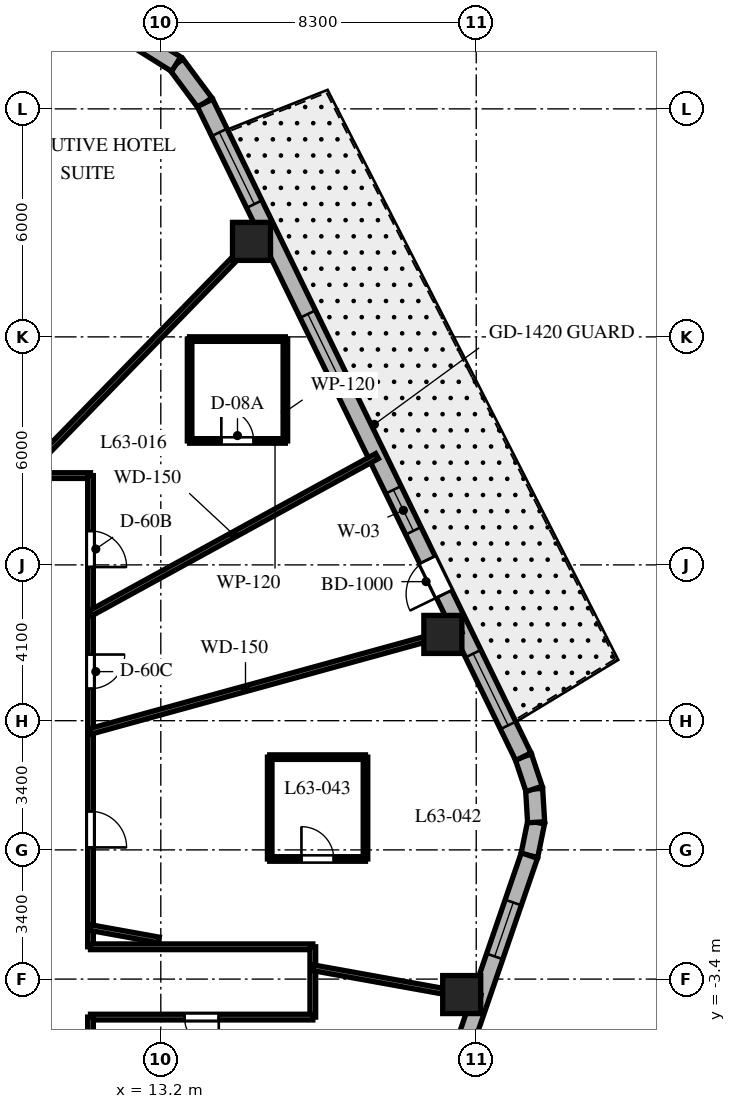
"""IFC4 building model, lengths in metres.
Left out: names, types, materials, properties, quantities, classifications, styles, units other than length and angle.
Written with IfcOpenShell. Run it as: python <this file> out.ifc"""

import sys

from ifc_helpers import new_model, si_unit, direction, frame, frame_2d, origin, origin_2d, place, context, subcontext, project, spatial, rectangle, extrude, element, fill, save


model = new_model("IFC4")
c1 = context("Model", 3, precision=1e-05, world=origin(), true_north=direction((0.0, 1.0)))
c2 = subcontext(c1, "Body", "Model", "MODEL_VIEW")
j1 = project(units=[si_unit("LENGTHUNIT", "METRE"), si_unit("PLANEANGLEUNIT", "RADIAN")], contexts=[c1])
p1 = place(None, origin())
s1 = spatial("IfcSite", under=j1, at=p1, CompositionType="ELEMENT")
p2 = place(p1, origin())
s2 = spatial("IfcBuilding", under=s1, at=p2, CompositionType="ELEMENT")
p3 = place(p2, frame((0.0, 0.0, 252.1)))
s3 = spatial("IfcBuildingStorey", under=s2, at=p3, CompositionType="ELEMENT", Elevation=252.1)
for number, where, z_axis, x_axis in (
    (1, (21.118, -3.807, 0.0), (0.0, 0.0, 1.0), (1.0, 0.0, 0.0)),
    (2, (20.622, 5.67, 0.0), (0.0, 0.0, 1.0), (1.0, 0.0, 0.0)),
    (3, (15.587, 16.013, 0.0), (0.0, 0.0, 1.0), (1.0, 0.0, 0.0)),
):
    element("IfcColumn", number, at=place(p3, frame(where, z_axis=z_axis, x_axis=x_axis)), inside=s3, PredefinedType="COLUMN", context=c2, shape_type="SweptSolid", body=[
        extrude(rectangle(XDim=1.0, YDim=1.0, at=origin_2d()), origin(), (0.0, 0.0, 1.0), 3.8),
    ])
p4 = place(p3, frame((22.898, -0.15, 0.0), z_axis=(0.0, 0.0, 1.0), x_axis=(0.199055826889, 0.979988151858, 0.0)))
e4 = element("IfcWall", 4, at=p4, inside=s3, PredefinedType="SOLIDWALL", context=c2, shape_type="SweptSolid", body=[
    extrude(rectangle(XDim=0.894, YDim=0.45, at=frame_2d((0.447, 0.0))), origin(), (0.0, 0.0, 1.0), 3.48),
])
p5 = place(p3, frame((23.076, 0.727, 0.0), z_axis=(0.0, 0.0, 1.0), x_axis=(-0.060805222108, 0.998149650586, 0.0)))
e5 = element("IfcWall", 5, at=p5, inside=s3, PredefinedType="SOLIDWALL", context=c2, shape_type="SweptSolid", body=[
    extrude(rectangle(XDim=0.879, YDim=0.45, at=frame_2d((0.44, 0.0))), origin(), (0.0, 0.0, 1.0), 3.48),
])
p6 = place(p3, frame((23.023, 1.604, 0.0), z_axis=(0.0, 0.0, 1.0), x_axis=(-0.316801227695, 0.948491951537, 0.0)))
e6 = element("IfcWall", 6, at=p6, inside=s3, PredefinedType="SOLIDWALL", context=c2, shape_type="SweptSolid", body=[
    extrude(rectangle(XDim=0.894, YDim=0.45, at=frame_2d((0.447, 0.0))), origin(), (0.0, 0.0, 1.0), 3.48),
])
p7 = place(p3, frame((14.362, 19.658, 0.0), z_axis=(0.0, 0.0, 1.0), x_axis=(-0.596642462792, 0.80250717853, 0.0)))
e7 = element("IfcWall", 7, at=p7, inside=s3, PredefinedType="SOLIDWALL", context=c2, shape_type="SweptSolid", body=[
    extrude(rectangle(XDim=1.27, YDim=0.45, at=frame_2d((0.635, 0.0))), origin(), (0.0, 0.0, 1.0), 3.48),
])
p8 = place(p3, frame((13.604, 20.678, 0.0), z_axis=(0.0, 0.0, 1.0), x_axis=(-0.847910404124, 0.53013955387, 0.0)))
e8 = element("IfcWall", 8, at=p8, inside=s3, PredefinedType="SOLIDWALL", context=c2, shape_type="SweptSolid", body=[
    extrude(rectangle(XDim=1.249, YDim=0.45, at=frame_2d((0.624, 0.0))), origin(), (0.0, 0.0, 1.0), 3.48),
])
p9 = place(p3, frame((16.324, -19.275, 0.0), z_axis=(0.0, 0.0, 1.0), x_axis=(0.325083142304, 0.945685439557, 0.0)))
e9 = element("IfcWall", 9, at=p9, inside=s3, PredefinedType="SOLIDWALL", context=c2, shape_type="SweptSolid", body=[
    extrude(rectangle(XDim=20.224, YDim=0.45, at=frame_2d((10.112, 0.0))), origin(), (0.0, 0.0, 1.0), 3.48),
])
p10 = place(p9, frame((1.253, 0.0, 0.8)))
e10 = element("IfcOpeningElement", 10, at=p10, cuts=e9, PredefinedType="OPENING", context=c2, shape_type="SweptSolid", body=[
    extrude(rectangle(XDim=1.5, YDim=1.8, at=frame_2d((0.75, 0.9))), frame((0.0, 0.235, 0.0), z_axis=(0.0, -1.0, 0.0), x_axis=(1.0, 0.0, 0.0)), (0.0, 0.0, 1.0), 0.47),
])
p11 = place(p9, frame((6.568, 0.0, 0.8)))
e11 = element("IfcOpeningElement", 11, at=p11, cuts=e9, PredefinedType="OPENING", context=c2, shape_type="SweptSolid", body=[
    extrude(rectangle(XDim=1.5, YDim=1.8, at=frame_2d((0.75, 0.9))), frame((0.0, 0.235, 0.0), z_axis=(0.0, -1.0, 0.0), x_axis=(1.0, 0.0, 0.0)), (0.0, 0.0, 1.0), 0.47),
])
p12 = place(p9, frame((12.25, 0.0, 0.8)))
e12 = element("IfcOpeningElement", 12, at=p12, cuts=e9, PredefinedType="OPENING", context=c2, shape_type="SweptSolid", body=[
    extrude(rectangle(XDim=1.5, YDim=1.8, at=frame_2d((0.75, 0.9))), frame((0.0, 0.235, 0.0), z_axis=(0.0, -1.0, 0.0), x_axis=(1.0, 0.0, 0.0)), (0.0, 0.0, 1.0), 0.47),
])
p13 = place(p9, frame((17.418, 0.0, 0.8)))
e13 = element("IfcOpeningElement", 13, at=p13, cuts=e9, PredefinedType="OPENING", context=c2, shape_type="SweptSolid", body=[
    extrude(rectangle(XDim=1.5, YDim=1.8, at=frame_2d((0.75, 0.9))), frame((0.0, 0.235, 0.0), z_axis=(0.0, -1.0, 0.0), x_axis=(1.0, 0.0, 0.0)), (0.0, 0.0, 1.0), 0.47),
])
p14 = place(p3, frame((22.74, 2.452, 0.0), z_axis=(0.0, 0.0, 1.0), x_axis=(-0.437753424814, 0.899095066755, 0.0)))
e14 = element("IfcWall", 14, at=p14, inside=s3, PredefinedType="SOLIDWALL", context=c2, shape_type="SweptSolid", body=[
    extrude(rectangle(XDim=19.137, YDim=0.45, at=frame_2d((9.569, 0.0))), origin(), (0.0, 0.0, 1.0), 3.48),
])
p15 = place(p14, frame((4.763, 0.0, 0.0)))
e15 = element("IfcOpeningElement", 15, at=p15, cuts=e14, PredefinedType="OPENING", context=c2, shape_type="SweptSolid", body=[
    extrude(rectangle(XDim=1.0, YDim=2.15, at=frame_2d((0.5, 1.075))), frame((0.0, 0.235, 0.0), z_axis=(0.0, -1.0, 0.0), x_axis=(1.0, 0.0, 0.0)), (0.0, 0.0, 1.0), 0.47),
])
p16 = place(p14, frame((6.611, 0.0, 0.8)))
e16 = element("IfcOpeningElement", 16, at=p16, cuts=e14, PredefinedType="OPENING", context=c2, shape_type="SweptSolid", body=[
    extrude(rectangle(XDim=1.2, YDim=1.8, at=frame_2d((0.6, 0.9))), frame((0.0, 0.235, 0.0), z_axis=(0.0, -1.0, 0.0), x_axis=(1.0, 0.0, 0.0)), (0.0, 0.0, 1.0), 0.47),
])
p17 = place(p14, frame((10.856, 0.0, 0.8)))
e17 = element("IfcOpeningElement", 17, at=p17, cuts=e14, PredefinedType="OPENING", context=c2, shape_type="SweptSolid", body=[
    extrude(rectangle(XDim=2.1, YDim=1.85, at=frame_2d((1.05, 0.925))), frame((0.0, 0.235, 0.0), z_axis=(0.0, -1.0, 0.0), x_axis=(1.0, 0.0, 0.0)), (0.0, 0.0, 1.0), 0.47),
])
p18 = place(p14, frame((16.173, 0.0, 0.8)))
e18 = element("IfcOpeningElement", 18, at=p18, cuts=e14, PredefinedType="OPENING", context=c2, shape_type="SweptSolid", body=[
    extrude(rectangle(XDim=2.1, YDim=1.85, at=frame_2d((1.05, 0.925))), frame((0.0, 0.235, 0.0), z_axis=(0.0, -1.0, 0.0), x_axis=(1.0, 0.0, 0.0)), (0.0, 0.0, 1.0), 0.47),
])
p19 = place(p14, frame((0.916, 0.0, 0.8)))
e19 = element("IfcOpeningElement", 19, at=p19, cuts=e14, PredefinedType="OPENING", context=c2, shape_type="SweptSolid", body=[
    extrude(rectangle(XDim=2.1, YDim=1.85, at=frame_2d((1.05, 0.925))), frame((0.0, 0.235, 0.0), z_axis=(0.0, -1.0, 0.0), x_axis=(1.0, 0.0, 0.0)), (0.0, 0.0, 1.0), 0.47),
])
p20 = place(p3, frame((0.92, 9.85, 0.0), z_axis=(0.0, 0.0, 1.0), x_axis=(1.0, 0.0, 0.0)))
e20 = element("IfcWall", 20, at=p20, inside=s3, PredefinedType="PARTITIONING", context=c2, shape_type="SweptSolid", body=[
    extrude(rectangle(XDim=10.43, YDim=0.15, at=frame_2d((5.215, 0.0))), origin(), (0.0, 0.0, 1.0), 2.97),
])
p21 = place(p20, frame((4.949, 0.0, 0.0)))
e21 = element("IfcOpeningElement", 21, at=p21, cuts=e20, PredefinedType="OPENING", context=c2, shape_type="SweptSolid", body=[
    extrude(rectangle(XDim=0.95, YDim=2.03, at=frame_2d((0.475, 1.015))), frame((0.0, 0.085, 0.0), z_axis=(0.0, -1.0, 0.0), x_axis=(1.0, 0.0, 0.0)), (0.0, 0.0, 1.0), 0.17),
])
p22 = place(p3, frame((11.35, 9.85, 0.0), z_axis=(0.0, 0.0, 1.0), x_axis=(0.0, -1.0, 0.0)))
e22 = element("IfcWall", 22, at=p22, inside=s3, PredefinedType="PARTITIONING", context=c2, shape_type="SweptSolid", body=[
    extrude(rectangle(XDim=12.4, YDim=0.15, at=frame_2d((6.2, 0.0))), origin(), (0.0, 0.0, 1.0), 2.97),
])
p23 = place(p22, frame((4.709, 0.0, 0.0)))
e23 = element("IfcOpeningElement", 23, at=p23, cuts=e22, PredefinedType="OPENING", context=c2, shape_type="SweptSolid", body=[
    extrude(rectangle(XDim=0.9, YDim=2.03, at=frame_2d((0.45, 1.015))), frame((0.0, 0.085, 0.0), z_axis=(0.0, -1.0, 0.0), x_axis=(1.0, 0.0, 0.0)), (0.0, 0.0, 1.0), 0.17),
])
p24 = place(p22, frame((1.457, 0.0, 0.0)))
e24 = element("IfcOpeningElement", 24, at=p24, cuts=e22, PredefinedType="OPENING", context=c2, shape_type="SweptSolid", body=[
    extrude(rectangle(XDim=0.95, YDim=2.03, at=frame_2d((0.475, 1.015))), frame((0.0, 0.085, 0.0), z_axis=(0.0, -1.0, 0.0), x_axis=(1.0, 0.0, 0.0)), (0.0, 0.0, 1.0), 0.17),
])
p25 = place(p22, frame((8.835, 0.0, 0.0)))
e25 = element("IfcOpeningElement", 25, at=p25, cuts=e22, PredefinedType="OPENING", context=c2, shape_type="SweptSolid", body=[
    extrude(rectangle(XDim=0.95, YDim=2.03, at=frame_2d((0.475, 1.015))), frame((0.0, 0.085, 0.0), z_axis=(0.0, -1.0, 0.0), x_axis=(1.0, 0.0, 0.0)), (0.0, 0.0, 1.0), 0.17),
])
p26 = place(p3, frame((11.35, -2.55, 0.0), z_axis=(0.0, 0.0, 1.0), x_axis=(1.0, 0.0, 0.0)))
e26 = element("IfcWall", 26, at=p26, inside=s3, PredefinedType="PARTITIONING", context=c2, shape_type="SweptSolid", body=[
    extrude(rectangle(XDim=5.85, YDim=0.15, at=frame_2d((2.925, 0.0))), origin(), (0.0, 0.0, 1.0), 2.92),
])
p27 = place(p3, frame((17.2, -2.55, 0.0), z_axis=(0.0, 0.0, 1.0), x_axis=(0.0, -1.0, 0.0)))
e27 = element("IfcWall", 27, at=p27, inside=s3, PredefinedType="PARTITIONING", context=c2, shape_type="SweptSolid", body=[
    extrude(rectangle(XDim=1.85, YDim=0.15, at=frame_2d((0.925, 0.0))), origin(), (0.0, 0.0, 1.0), 2.92),
])
p28 = place(p3, frame((17.2, -4.4, 0.0), z_axis=(0.0, 0.0, 1.0), x_axis=(-1.0, 0.0, 0.0)))
e28 = element("IfcWall", 28, at=p28, inside=s3, PredefinedType="PARTITIONING", context=c2, shape_type="SweptSolid", body=[
    extrude(rectangle(XDim=5.85, YDim=0.15, at=frame_2d((2.925, 0.0))), origin(), (0.0, 0.0, 1.0), 2.92),
])
p29 = place(p28, frame((2.475, 0.0, 0.0)))
e29 = element("IfcOpeningElement", 29, at=p29, cuts=e28, PredefinedType="OPENING", context=c2, shape_type="SweptSolid", body=[
    extrude(rectangle(XDim=0.9, YDim=2.03, at=frame_2d((0.45, 1.015))), frame((0.0, 0.085, 0.0), z_axis=(0.0, -1.0, 0.0), x_axis=(1.0, 0.0, 0.0)), (0.0, 0.0, 1.0), 0.17),
])
p30 = place(p3, frame((11.35, -4.4, 0.0), z_axis=(0.0, 0.0, 1.0), x_axis=(0.0, -1.0, 0.0)))
e30 = element("IfcWall", 30, at=p30, inside=s3, PredefinedType="PARTITIONING", context=c2, shape_type="SweptSolid", body=[
    extrude(rectangle(XDim=5.45, YDim=0.15, at=frame_2d((2.725, 0.0))), origin(), (0.0, 0.0, 1.0), 2.97),
])
p31 = place(p30, frame((2.694, 0.0, 0.0)))
e31 = element("IfcOpeningElement", 31, at=p31, cuts=e30, PredefinedType="OPENING", context=c2, shape_type="SweptSolid", body=[
    extrude(rectangle(XDim=0.95, YDim=2.03, at=frame_2d((0.475, 1.015))), frame((0.0, 0.085, 0.0), z_axis=(0.0, -1.0, 0.0), x_axis=(1.0, 0.0, 0.0)), (0.0, 0.0, 1.0), 0.17),
])
p32 = place(p3, frame((11.35, 3.121, 0.0), z_axis=(0.0, 0.0, 1.0), x_axis=(0.964212793822, 0.265129568758, 0.0)))
e32 = element("IfcWall", 32, at=p32, inside=s3, PredefinedType="PARTITIONING", context=c2, shape_type="SweptSolid", body=[
    extrude(rectangle(XDim=10.12, YDim=0.15, at=frame_2d((5.06, 0.0))), origin(), (0.0, 0.0, 1.0), 2.72),
])
p33 = place(p3, frame((11.35, 6.227, 0.0), z_axis=(0.0, 0.0, 1.0), x_axis=(0.876723190824, 0.480995266786, 0.0)))
e33 = element("IfcWall", 33, at=p33, inside=s3, PredefinedType="PARTITIONING", context=c2, shape_type="SweptSolid", body=[
    extrude(rectangle(XDim=8.598, YDim=0.15, at=frame_2d((4.299, 0.0))), origin(), (0.0, 0.0, 1.0), 2.72),
])
p34 = place(p3, frame((9.588, 9.85, 0.0), z_axis=(0.0, 0.0, 1.0), x_axis=(0.697519469595, 0.716565830567, 0.0)))
e34 = element("IfcWall", 34, at=p34, inside=s3, PredefinedType="PARTITIONING", context=c2, shape_type="SweptSolid", body=[
    extrude(rectangle(XDim=9.126, YDim=0.15, at=frame_2d((4.563, 0.0))), origin(), (0.0, 0.0, 1.0), 2.72),
])
p35 = place(p3, frame((11.35, -2.046, 0.0), z_axis=(0.0, 0.0, 1.0), x_axis=(0.984127783205, -0.177461281195, 0.0)))
e35 = element("IfcWall", 35, at=p35, inside=s3, PredefinedType="PARTITIONING", context=c2, shape_type="SweptSolid", body=[
    extrude(rectangle(XDim=1.826, YDim=0.15, at=frame_2d((0.913, 0.0))), origin(), (0.0, 0.0, 1.0), 3.48),
])
p36 = place(p3, frame((17.2, -3.101, 0.0), z_axis=(0.0, 0.0, 1.0), x_axis=(0.98413465883, -0.177423147559, 0.0)))
e36 = element("IfcWall", 36, at=p36, inside=s3, PredefinedType="PARTITIONING", context=c2, shape_type="SweptSolid", body=[
    extrude(rectangle(XDim=4.482, YDim=0.15, at=frame_2d((2.241, 0.0))), origin(), (0.0, 0.0, 1.0), 2.72),
])
p37 = place(p3, frame((13.958, 10.762, 0.0), z_axis=(0.0, 0.0, 1.0), x_axis=(1.0, 0.0, 0.0)))
e37 = element("IfcWall", 37, at=p37, inside=s3, PredefinedType="PARTITIONING", context=c2, shape_type="SweptSolid", body=[
    extrude(rectangle(XDim=2.52, YDim=0.12, at=frame_2d((1.26, 0.0))), origin(), (0.0, 0.0, 1.0), 3.006),
])
p38 = place(p37, frame((0.835, 0.0, 0.0)))
e38 = element("IfcOpeningElement", 38, at=p38, cuts=e37, PredefinedType="OPENING", context=c2, shape_type="SweptSolid", body=[
    extrude(rectangle(XDim=0.85, YDim=2.03, at=frame_2d((0.425, 1.015))), frame((0.0, 0.07, 0.0), z_axis=(0.0, -1.0, 0.0), x_axis=(1.0, 0.0, 0.0)), (0.0, 0.0, 1.0), 0.14),
])
p39 = place(p3, frame((16.478, 10.762, 0.0), z_axis=(0.0, 0.0, 1.0), x_axis=(0.0, 1.0, 0.0)))
e39 = element("IfcWall", 39, at=p39, inside=s3, PredefinedType="PARTITIONING", context=c2, shape_type="SweptSolid", body=[
    extrude(rectangle(XDim=2.68, YDim=0.12, at=frame_2d((1.34, 0.0))), origin(), (0.0, 0.0, 1.0), 3.48),
])
p40 = place(p3, frame((16.478, 13.442, 0.0), z_axis=(0.0, 0.0, 1.0), x_axis=(-1.0, 0.0, 0.0)))
e40 = element("IfcWall", 40, at=p40, inside=s3, PredefinedType="PARTITIONING", context=c2, shape_type="SweptSolid", body=[
    extrude(rectangle(XDim=2.52, YDim=0.12, at=frame_2d((1.26, 0.0))), origin(), (0.0, 0.0, 1.0), 3.48),
])
p41 = place(p3, frame((13.958, 13.442, 0.0), z_axis=(0.0, 0.0, 1.0), x_axis=(0.0, -1.0, 0.0)))
e41 = element("IfcWall", 41, at=p41, inside=s3, PredefinedType="PARTITIONING", context=c2, shape_type="SweptSolid", body=[
    extrude(rectangle(XDim=2.68, YDim=0.12, at=frame_2d((1.34, 0.0))), origin(), (0.0, 0.0, 1.0), 3.006),
])
p42 = place(p3, frame((16.066, -0.239, 0.0), z_axis=(0.0, 0.0, 1.0), x_axis=(1.0, 0.0, 0.0)))
e42 = element("IfcWall", 42, at=p42, inside=s3, PredefinedType="PARTITIONING", context=c2, shape_type="SweptSolid", body=[
    extrude(rectangle(XDim=2.52, YDim=0.12, at=frame_2d((1.26, 0.0))), origin(), (0.0, 0.0, 1.0), 2.92),
])
p43 = place(p42, frame((0.835, 0.0, 0.0)))
e43 = element("IfcOpeningElement", 43, at=p43, cuts=e42, PredefinedType="OPENING", context=c2, shape_type="SweptSolid", body=[
    extrude(rectangle(XDim=0.85, YDim=2.03, at=frame_2d((0.425, 1.015))), frame((0.0, 0.07, 0.0), z_axis=(0.0, -1.0, 0.0), x_axis=(1.0, 0.0, 0.0)), (0.0, 0.0, 1.0), 0.14),
])
p44 = place(p3, frame((18.586, -0.239, 0.0), z_axis=(0.0, 0.0, 1.0), x_axis=(0.0, 1.0, 0.0)))
e44 = element("IfcWall", 44, at=p44, inside=s3, PredefinedType="PARTITIONING", context=c2, shape_type="SweptSolid", body=[
    extrude(rectangle(XDim=2.68, YDim=0.12, at=frame_2d((1.34, 0.0))), origin(), (0.0, 0.0, 1.0), 3.48),
])
p45 = place(p3, frame((18.586, 2.441, 0.0), z_axis=(0.0, 0.0, 1.0), x_axis=(-1.0, 0.0, 0.0)))
e45 = element("IfcWall", 45, at=p45, inside=s3, PredefinedType="PARTITIONING", context=c2, shape_type="SweptSolid", body=[
    extrude(rectangle(XDim=2.52, YDim=0.12, at=frame_2d((1.26, 0.0))), origin(), (0.0, 0.0, 1.0), 2.92),
])
p46 = place(p3, frame((16.066, 2.441, 0.0), z_axis=(0.0, 0.0, 1.0), x_axis=(0.0, -1.0, 0.0)))
e46 = element("IfcWall", 46, at=p46, inside=s3, PredefinedType="PARTITIONING", context=c2, shape_type="SweptSolid", body=[
    extrude(rectangle(XDim=2.68, YDim=0.12, at=frame_2d((1.34, 0.0))), origin(), (0.0, 0.0, 1.0), 3.48),
])
p47 = place(p13, origin())
e47 = element("IfcWindow", 47, at=p47, inside=s3, PartitioningType="SINGLE_PANEL", PredefinedType="WINDOW", context=c2, shape_type="SweptSolid", body=[
    extrude(rectangle(XDim=1.5, YDim=1.8, at=frame_2d((0.75, 0.9))), frame((0.0, 0.03, 0.0), z_axis=(0.0, -1.0, 0.0), x_axis=(1.0, 0.0, 0.0)), (0.0, 0.0, 1.0), 0.06),
])
fill(e13, e47)
p48 = place(p15, origin())
e48 = element("IfcDoor", 48, at=p48, inside=s3, OperationType="SINGLE_SWING_LEFT", PredefinedType="DOOR", context=c2, shape_type="SweptSolid", body=[
    extrude(rectangle(XDim=1.0, YDim=2.15, at=frame_2d((0.5, 1.075))), frame((0.0, 0.025, 0.0), z_axis=(0.0, -1.0, 0.0), x_axis=(1.0, 0.0, 0.0)), (0.0, 0.0, 1.0), 0.05),
])
fill(e15, e48)
p49 = place(p16, origin())
e49 = element("IfcWindow", 49, at=p49, inside=s3, PartitioningType="SINGLE_PANEL", PredefinedType="WINDOW", context=c2, shape_type="SweptSolid", body=[
    extrude(rectangle(XDim=1.2, YDim=1.8, at=frame_2d((0.6, 0.9))), frame((0.0, 0.03, 0.0), z_axis=(0.0, -1.0, 0.0), x_axis=(1.0, 0.0, 0.0)), (0.0, 0.0, 1.0), 0.06),
])
fill(e16, e49)
p50 = place(p17, origin())
e50 = element("IfcWindow", 50, at=p50, inside=s3, PartitioningType="SINGLE_PANEL", PredefinedType="WINDOW", context=c2, shape_type="SweptSolid", body=[
    extrude(rectangle(XDim=2.1, YDim=1.85, at=frame_2d((1.05, 0.925))), frame((0.0, 0.03, 0.0), z_axis=(0.0, -1.0, 0.0), x_axis=(1.0, 0.0, 0.0)), (0.0, 0.0, 1.0), 0.06),
])
fill(e17, e50)
p51 = place(p18, origin())
e51 = element("IfcWindow", 51, at=p51, inside=s3, PartitioningType="SINGLE_PANEL", PredefinedType="WINDOW", context=c2, shape_type="SweptSolid", body=[
    extrude(rectangle(XDim=2.1, YDim=1.85, at=frame_2d((1.05, 0.925))), frame((0.0, 0.03, 0.0), z_axis=(0.0, -1.0, 0.0), x_axis=(1.0, 0.0, 0.0)), (0.0, 0.0, 1.0), 0.06),
])
fill(e18, e51)
p52 = place(p19, origin())
e52 = element("IfcWindow", 52, at=p52, inside=s3, PartitioningType="SINGLE_PANEL", PredefinedType="WINDOW", context=c2, shape_type="SweptSolid", body=[
    extrude(rectangle(XDim=2.1, YDim=1.85, at=frame_2d((1.05, 0.925))), frame((0.0, 0.03, 0.0), z_axis=(0.0, -1.0, 0.0), x_axis=(1.0, 0.0, 0.0)), (0.0, 0.0, 1.0), 0.06),
])
fill(e19, e52)
p53 = place(p23, origin())
e53 = element("IfcDoor", 53, at=p53, inside=s3, OperationType="SINGLE_SWING_LEFT", PredefinedType="DOOR", context=c2, shape_type="SweptSolid", body=[
    extrude(rectangle(XDim=0.9, YDim=2.03, at=frame_2d((0.45, 1.015))), frame((0.0, 0.025, 0.0), z_axis=(0.0, -1.0, 0.0), x_axis=(1.0, 0.0, 0.0)), (0.0, 0.0, 1.0), 0.05),
])
fill(e23, e53)
p54 = place(p24, origin())
e54 = element("IfcDoor", 54, at=p54, inside=s3, OperationType="SINGLE_SWING_RIGHT", PredefinedType="DOOR", context=c2, shape_type="SweptSolid", body=[
    extrude(rectangle(XDim=0.95, YDim=2.03, at=frame_2d((0.475, 1.015))), frame((0.0, 0.025, 0.0), z_axis=(0.0, -1.0, 0.0), x_axis=(1.0, 0.0, 0.0)), (0.0, 0.0, 1.0), 0.05),
])
fill(e24, e54)
p55 = place(p38, origin())
e55 = element("IfcDoor", 55, at=p55, inside=s3, OperationType="SINGLE_SWING_LEFT", PredefinedType="DOOR", context=c2, shape_type="SweptSolid", body=[
    extrude(rectangle(XDim=0.85, YDim=2.03, at=frame_2d((0.425, 1.015))), frame((0.0, 0.025, 0.0), z_axis=(0.0, -1.0, 0.0), x_axis=(1.0, 0.0, 0.0)), (0.0, 0.0, 1.0), 0.05),
])
fill(e38, e55)
p56 = place(p29, origin())
e56 = element("IfcDoor", 56, at=p56, inside=s3, OperationType="SINGLE_SWING_LEFT", PredefinedType="DOOR", context=c2, shape_type="SweptSolid", body=[
    extrude(rectangle(XDim=0.9, YDim=2.03, at=frame_2d((0.45, 1.015))), frame((0.0, 0.025, 0.0), z_axis=(0.0, -1.0, 0.0), x_axis=(1.0, 0.0, 0.0)), (0.0, 0.0, 1.0), 0.05),
])
fill(e29, e56)
p57 = place(p25, origin())
e57 = element("IfcDoor", 57, at=p57, inside=s3, OperationType="SINGLE_SWING_RIGHT", PredefinedType="DOOR", context=c2, shape_type="SweptSolid", body=[
    extrude(rectangle(XDim=0.95, YDim=2.03, at=frame_2d((0.475, 1.015))), frame((0.0, 0.025, 0.0), z_axis=(0.0, -1.0, 0.0), x_axis=(1.0, 0.0, 0.0)), (0.0, 0.0, 1.0), 0.05),
])
fill(e25, e57)
p58 = place(p43, origin())
e58 = element("IfcDoor", 58, at=p58, inside=s3, OperationType="SINGLE_SWING_LEFT", PredefinedType="DOOR", context=c2, shape_type="SweptSolid", body=[
    extrude(rectangle(XDim=0.85, YDim=2.03, at=frame_2d((0.425, 1.015))), frame((0.0, 0.025, 0.0), z_axis=(0.0, -1.0, 0.0), x_axis=(1.0, 0.0, 0.0)), (0.0, 0.0, 1.0), 0.05),
])
fill(e43, e58)
save(model, sys.argv[1])
